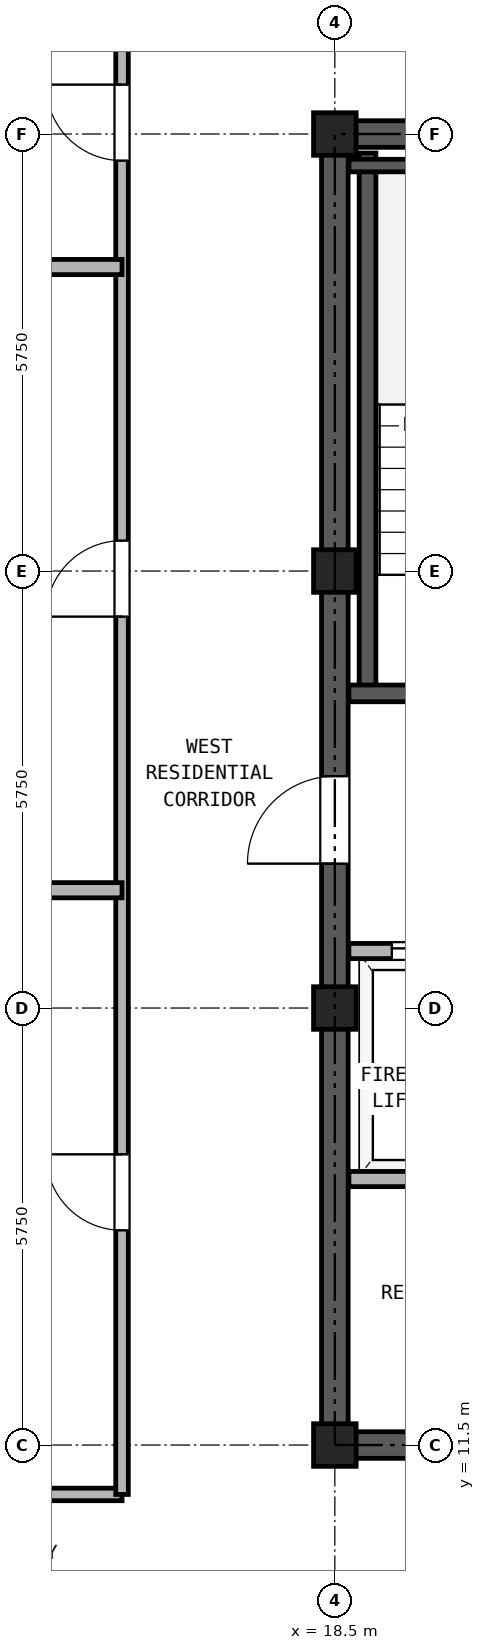
"""IFC4 building model, lengths in metres.
Left out: names, types, materials, properties, quantities, classifications, styles, units other than length and angle.
Written with IfcOpenShell. Run it as: python <this file> out.ifc"""

import sys

from ifc_helpers import new_model, si_unit, direction, frame, frame_2d, origin, origin_2d, place, context, subcontext, project, spatial, rectangle, hollow_rectangle, extrude, source, transform, mapped, element, fill, save


model = new_model("IFC4")
c1 = context("Model", 3, precision=1e-05, world=origin(), true_north=direction((0.0, 1.0)))
c2 = subcontext(c1, "Body", "Model", "MODEL_VIEW")
j1 = project(units=[si_unit("LENGTHUNIT", "METRE"), si_unit("PLANEANGLEUNIT", "RADIAN")], contexts=[c1])
p1 = place(None, origin())
s1 = spatial("IfcSite", under=j1, at=p1, CompositionType="ELEMENT")
p2 = place(p1, origin())
s2 = spatial("IfcBuilding", under=s1, at=p2, CompositionType="ELEMENT")
p3 = place(p2, frame((0.0, 0.0, 261.7)))
s3 = spatial("IfcBuildingStorey", under=s2, at=p3, CompositionType="ELEMENT", Elevation=261.7)
m1 = source(origin(), c2, "Body", "SweptSolid", [
    extrude(hollow_rectangle(XDim=0.56, YDim=0.56, WallThickness=0.03, at=origin_2d()), origin(), (0.0, 0.0, 1.0), 2.98),
])
for number, where, z_axis, x_axis in (
    (1, (18.5, 11.5, 0.0), (0.0, 0.0, 1.0), (1.0, 0.0, 0.0)),
    (2, (18.5, 17.25, 0.0), (0.0, 0.0, 1.0), (1.0, 0.0, 0.0)),
    (3, (18.5, 23.0, 0.0), (0.0, 0.0, 1.0), (1.0, 0.0, 0.0)),
    (4, (18.5, 28.75, 0.0), (0.0, 0.0, 1.0), (1.0, 0.0, 0.0)),
):
    element("IfcColumn", number, at=place(p3, frame(where, z_axis=z_axis, x_axis=x_axis)), inside=s3, PredefinedType="COLUMN", context=c2, shape_type="MappedRepresentation", body=[
        mapped(m1, transform((0.0, 0.0, 0.0), x_axis=(1.0, 0.0, 0.0), y_axis=(0.0, 1.0, 0.0), z_axis=(0.0, 0.0, 1.0), scale=1.0)),
    ])
p4 = place(p3, frame((18.325, 11.5, 0.0), z_axis=(0.0, 0.0, 1.0), x_axis=(1.0, 0.0, 0.0)))
e5 = element("IfcWall", 5, at=p4, inside=s3, PredefinedType="SHEAR", context=c2, shape_type="SweptSolid", body=[
    extrude(rectangle(XDim=10.35, YDim=0.35, at=frame_2d((5.175, 0.0))), origin(), (0.0, 0.0, 1.0), 2.98),
])
p5 = place(p4, frame((1.775, 0.0, 0.0)))
e6 = element("IfcOpeningElement", 6, at=p5, cuts=e5, PredefinedType="OPENING", context=c2, shape_type="SweptSolid", body=[
    extrude(rectangle(XDim=0.95, YDim=2.15, at=frame_2d((0.475, 1.075))), frame((0.0, 0.185, 0.0), z_axis=(0.0, -1.0, 0.0), x_axis=(1.0, 0.0, 0.0)), (0.0, 0.0, 1.0), 0.37),
])
p6 = place(p4, frame((5.275, 0.0, 0.0)))
e7 = element("IfcOpeningElement", 7, at=p6, cuts=e5, PredefinedType="OPENING", context=c2, shape_type="SweptSolid", body=[
    extrude(rectangle(XDim=0.95, YDim=2.15, at=frame_2d((0.475, 1.075))), frame((0.0, 0.185, 0.0), z_axis=(0.0, -1.0, 0.0), x_axis=(1.0, 0.0, 0.0)), (0.0, 0.0, 1.0), 0.37),
])
p7 = place(p4, frame((8.175, 0.0, 0.0)))
e8 = element("IfcOpeningElement", 8, at=p7, cuts=e5, PredefinedType="OPENING", context=c2, shape_type="SweptSolid", body=[
    extrude(rectangle(XDim=1.1, YDim=2.25, at=frame_2d((0.55, 1.125))), frame((0.0, 0.185, 0.0), z_axis=(0.0, -1.0, 0.0), x_axis=(1.0, 0.0, 0.0)), (0.0, 0.0, 1.0), 0.37),
])
p8 = place(p3, frame((18.325, 28.75, 0.0), z_axis=(0.0, 0.0, 1.0), x_axis=(1.0, 0.0, 0.0)))
e9 = element("IfcWall", 9, at=p8, inside=s3, PredefinedType="SHEAR", context=c2, shape_type="SweptSolid", body=[
    extrude(rectangle(XDim=10.35, YDim=0.35, at=frame_2d((5.175, 0.0))), origin(), (0.0, 0.0, 1.0), 2.98),
])
p9 = place(p8, frame((4.055, 0.0, 0.0)))
e10 = element("IfcOpeningElement", 10, at=p9, cuts=e9, PredefinedType="OPENING", context=c2, shape_type="SweptSolid", body=[
    extrude(rectangle(XDim=0.9, YDim=2.05, at=frame_2d((0.45, 1.025))), frame((0.0, 0.185, 0.0), z_axis=(0.0, -1.0, 0.0), x_axis=(1.0, 0.0, 0.0)), (0.0, 0.0, 1.0), 0.37),
])
p10 = place(p8, frame((5.595, 0.0, 0.0)))
e11 = element("IfcOpeningElement", 11, at=p10, cuts=e9, PredefinedType="OPENING", context=c2, shape_type="SweptSolid", body=[
    extrude(rectangle(XDim=0.9, YDim=2.05, at=frame_2d((0.45, 1.025))), frame((0.0, 0.185, 0.0), z_axis=(0.0, -1.0, 0.0), x_axis=(1.0, 0.0, 0.0)), (0.0, 0.0, 1.0), 0.37),
])
p11 = place(p3, frame((18.5, 11.675, 0.0), z_axis=(0.0, 0.0, 1.0), x_axis=(0.0, 1.0, 0.0)))
e12 = element("IfcWall", 12, at=p11, inside=s3, PredefinedType="SHEAR", context=c2, shape_type="SweptSolid", body=[
    extrude(rectangle(XDim=16.9, YDim=0.35, at=frame_2d((8.45, 0.0))), origin(), (0.0, 0.0, 1.0), 2.98),
])
p12 = place(p11, frame((7.475, 0.0, 0.0)))
e13 = element("IfcOpeningElement", 13, at=p12, cuts=e12, PredefinedType="OPENING", context=c2, shape_type="SweptSolid", body=[
    extrude(rectangle(XDim=1.15, YDim=2.2, at=frame_2d((0.575, 1.1))), frame((0.0, 0.185, 0.0), z_axis=(0.0, -1.0, 0.0), x_axis=(1.0, 0.0, 0.0)), (0.0, 0.0, 1.0), 0.37),
])
p13 = place(p3, frame((18.93, 21.39, 0.0), z_axis=(0.0, 0.0, 1.0), x_axis=(0.0, 1.0, 0.0)))
e14 = element("IfcWall", 14, at=p13, inside=s3, PredefinedType="SOLIDWALL", context=c2, shape_type="SweptSolid", body=[
    extrude(rectangle(XDim=7.11, YDim=0.22, at=frame_2d((3.555, 0.0))), origin(), (0.0, 0.0, 1.0), 2.98),
])
p14 = place(p3, frame((18.685, 28.335, 0.0), z_axis=(0.0, 0.0, 1.0), x_axis=(1.0, 0.0, 0.0)))
e15 = element("IfcWall", 15, at=p14, inside=s3, PredefinedType="PARTITIONING", context=c2, shape_type="SweptSolid", body=[
    extrude(rectangle(XDim=3.425, YDim=0.165, at=frame_2d((1.712, 0.0))), origin(), (0.0, 0.0, 1.0), 2.98),
])
p15 = place(p3, frame((18.685, 21.39, 0.0), z_axis=(0.0, 0.0, 1.0), x_axis=(1.0, 0.0, 0.0)))
e16 = element("IfcWall", 16, at=p15, inside=s3, PredefinedType="SOLIDWALL", context=c2, shape_type="SweptSolid", body=[
    extrude(rectangle(XDim=6.445, YDim=0.22, at=frame_2d((3.222, 0.0))), origin(), (0.0, 0.0, 1.0), 2.98),
])
p16 = place(p15, frame((1.165, 0.0, 0.0)))
e17 = element("IfcOpeningElement", 17, at=p16, cuts=e16, PredefinedType="OPENING", context=c2, shape_type="SweptSolid", body=[
    extrude(rectangle(XDim=1.15, YDim=2.2, at=frame_2d((0.575, 1.1))), frame((0.0, 0.12, 0.0), z_axis=(0.0, -1.0, 0.0), x_axis=(1.0, 0.0, 0.0)), (0.0, 0.0, 1.0), 0.24),
])
p17 = place(p15, frame((4.895, 0.0, 0.0)))
e18 = element("IfcOpeningElement", 18, at=p17, cuts=e16, PredefinedType="OPENING", context=c2, shape_type="SweptSolid", body=[
    extrude(rectangle(XDim=1.1, YDim=2.25, at=frame_2d((0.55, 1.125))), frame((0.0, 0.12, 0.0), z_axis=(0.0, -1.0, 0.0), x_axis=(1.0, 0.0, 0.0)), (0.0, 0.0, 1.0), 0.24),
])
p18 = place(p3, frame((18.685, 18.0, 0.0), z_axis=(0.0, 0.0, 1.0), x_axis=(1.0, 0.0, 0.0)))
e19 = element("IfcWall", 19, at=p18, inside=s3, PredefinedType="PARTITIONING", context=c2, shape_type="SweptSolid", body=[
    extrude(rectangle(XDim=9.63, YDim=0.2, at=frame_2d((4.815, 0.0))), origin(), (0.0, 0.0, 1.0), 2.98),
])
p19 = place(p18, frame((0.565, 0.0, 0.0)))
e20 = element("IfcOpeningElement", 20, at=p19, cuts=e19, PredefinedType="OPENING", context=c2, shape_type="SweptSolid", body=[
    extrude(rectangle(XDim=1.3, YDim=2.3, at=frame_2d((0.65, 1.15))), frame((0.0, 0.11, 0.0), z_axis=(0.0, -1.0, 0.0), x_axis=(1.0, 0.0, 0.0)), (0.0, 0.0, 1.0), 0.22),
])
p20 = place(p18, frame((2.665, 0.0, 0.0)))
e21 = element("IfcOpeningElement", 21, at=p20, cuts=e19, PredefinedType="OPENING", context=c2, shape_type="SweptSolid", body=[
    extrude(rectangle(XDim=1.3, YDim=2.3, at=frame_2d((0.65, 1.15))), frame((0.0, 0.11, 0.0), z_axis=(0.0, -1.0, 0.0), x_axis=(1.0, 0.0, 0.0)), (0.0, 0.0, 1.0), 0.22),
])
p21 = place(p18, frame((5.065, 0.0, 0.0)))
e22 = element("IfcOpeningElement", 22, at=p21, cuts=e19, PredefinedType="OPENING", context=c2, shape_type="SweptSolid", body=[
    extrude(rectangle(XDim=0.9, YDim=2.05, at=frame_2d((0.45, 1.025))), frame((0.0, 0.11, 0.0), z_axis=(0.0, -1.0, 0.0), x_axis=(1.0, 0.0, 0.0)), (0.0, 0.0, 1.0), 0.22),
])
p22 = place(p18, frame((7.765, 0.0, 0.0)))
e23 = element("IfcOpeningElement", 23, at=p22, cuts=e19, PredefinedType="OPENING", context=c2, shape_type="SweptSolid", body=[
    extrude(rectangle(XDim=0.9, YDim=2.05, at=frame_2d((0.45, 1.025))), frame((0.0, 0.11, 0.0), z_axis=(0.0, -1.0, 0.0), x_axis=(1.0, 0.0, 0.0)), (0.0, 0.0, 1.0), 0.22),
])
p23 = place(p3, frame((18.685, 15.0, 0.0), z_axis=(0.0, 0.0, 1.0), x_axis=(1.0, 0.0, 0.0)))
e24 = element("IfcWall", 24, at=p23, inside=s3, PredefinedType="PARTITIONING", context=c2, shape_type="SweptSolid", body=[
    extrude(rectangle(XDim=9.63, YDim=0.2, at=frame_2d((4.815, 0.0))), origin(), (0.0, 0.0, 1.0), 2.98),
])
p24 = place(p3, frame((8.56, 10.85, 0.0), z_axis=(0.0, 0.0, 1.0), x_axis=(1.0, 0.0, 0.0)))
e25 = element("IfcWall", 25, at=p24, inside=s3, PredefinedType="PARTITIONING", context=c2, shape_type="SweptSolid", body=[
    extrude(rectangle(XDim=7.14, YDim=0.165, at=frame_2d((3.57, 0.0))), origin(), (0.0, 0.0, 1.0), 2.98),
])
p25 = place(p3, frame((15.7, 10.85, 0.0), z_axis=(0.0, 0.0, 1.0), x_axis=(0.0, 1.0, 0.0)))
e26 = element("IfcWall", 26, at=p25, inside=s3, PredefinedType="PARTITIONING", context=c2, shape_type="SweptSolid", body=[
    extrude(rectangle(XDim=24.29, YDim=0.165, at=frame_2d((12.145, 0.0))), origin(), (0.0, 0.0, 1.0), 2.98),
])
p26 = place(p25, frame((3.475, 0.0, 0.0)))
e27 = element("IfcOpeningElement", 27, at=p26, cuts=e26, PredefinedType="OPENING", context=c2, shape_type="SweptSolid", body=[
    extrude(rectangle(XDim=1.0, YDim=2.15, at=frame_2d((0.5, 1.075))), frame((0.0, 0.093, 0.0), z_axis=(0.0, -1.0, 0.0), x_axis=(1.0, 0.0, 0.0)), (0.0, 0.0, 1.0), 0.185),
])
p27 = place(p25, frame((11.55, 0.0, 0.0)))
e28 = element("IfcOpeningElement", 28, at=p27, cuts=e26, PredefinedType="OPENING", context=c2, shape_type="SweptSolid", body=[
    extrude(rectangle(XDim=1.0, YDim=2.15, at=frame_2d((0.5, 1.075))), frame((0.0, 0.093, 0.0), z_axis=(0.0, -1.0, 0.0), x_axis=(1.0, 0.0, 0.0)), (0.0, 0.0, 1.0), 0.185),
])
p28 = place(p25, frame((17.55, 0.0, 0.0)))
e29 = element("IfcOpeningElement", 29, at=p28, cuts=e26, PredefinedType="OPENING", context=c2, shape_type="SweptSolid", body=[
    extrude(rectangle(XDim=1.0, YDim=2.15, at=frame_2d((0.5, 1.075))), frame((0.0, 0.093, 0.0), z_axis=(0.0, -1.0, 0.0), x_axis=(1.0, 0.0, 0.0)), (0.0, 0.0, 1.0), 0.185),
])
for number, where, z_axis, x_axis in (
    (30, (5.36, 18.8, 0.0), (0.0, 0.0, 1.0), (1.0, 0.0, 0.0)),
    (31, (5.36, 27.0, 0.0), (0.0, 0.0, 1.0), (1.0, 0.0, 0.0)),
):
    element("IfcWall", number, at=place(p3, frame(where, z_axis=z_axis, x_axis=x_axis)), inside=s3, PredefinedType="PARTITIONING", context=c2, shape_type="SweptSolid", body=[
        extrude(rectangle(XDim=10.34, YDim=0.2, at=frame_2d((5.17, 0.0))), origin(), (0.0, 0.0, 1.0), 2.98),
    ])
p29 = place(p19, origin())
e32 = element("IfcDoor", 32, at=p29, inside=s3, OperationType="DOUBLE_DOOR_SLIDING", PredefinedType="DOOR", context=c2, shape_type="SweptSolid", body=[
    extrude(rectangle(XDim=1.3, YDim=2.3, at=frame_2d((0.65, 1.15))), frame((0.0, 0.025, 0.0), z_axis=(0.0, -1.0, 0.0), x_axis=(1.0, 0.0, 0.0)), (0.0, 0.0, 1.0), 0.05),
])
fill(e20, e32)
p30 = place(p12, frame((1.15, 0.0, 0.0), z_axis=(0.0, 0.0, 1.0), x_axis=(-1.0, 0.0, 0.0)))
e33 = element("IfcDoor", 33, at=p30, inside=s3, OperationType="SINGLE_SWING_LEFT", PredefinedType="DOOR", context=c2, shape_type="SweptSolid", body=[
    extrude(rectangle(XDim=1.15, YDim=2.2, at=frame_2d((0.575, 1.1))), frame((0.0, 0.025, 0.0), z_axis=(0.0, -1.0, 0.0), x_axis=(1.0, 0.0, 0.0)), (0.0, 0.0, 1.0), 0.05),
])
fill(e13, e33)
p31 = place(p26, origin())
e34 = element("IfcDoor", 34, at=p31, inside=s3, OperationType="SINGLE_SWING_RIGHT", PredefinedType="DOOR", context=c2, shape_type="SweptSolid", body=[
    extrude(rectangle(XDim=1.0, YDim=2.15, at=frame_2d((0.5, 1.075))), frame((0.0, 0.025, 0.0), z_axis=(0.0, -1.0, 0.0), x_axis=(1.0, 0.0, 0.0)), (0.0, 0.0, 1.0), 0.05),
])
fill(e27, e34)
p32 = place(p27, origin())
e35 = element("IfcDoor", 35, at=p32, inside=s3, OperationType="SINGLE_SWING_LEFT", PredefinedType="DOOR", context=c2, shape_type="SweptSolid", body=[
    extrude(rectangle(XDim=1.0, YDim=2.15, at=frame_2d((0.5, 1.075))), frame((0.0, 0.025, 0.0), z_axis=(0.0, -1.0, 0.0), x_axis=(1.0, 0.0, 0.0)), (0.0, 0.0, 1.0), 0.05),
])
fill(e28, e35)
p33 = place(p28, origin())
e36 = element("IfcDoor", 36, at=p33, inside=s3, OperationType="SINGLE_SWING_RIGHT", PredefinedType="DOOR", context=c2, shape_type="SweptSolid", body=[
    extrude(rectangle(XDim=1.0, YDim=2.15, at=frame_2d((0.5, 1.075))), frame((0.0, 0.025, 0.0), z_axis=(0.0, -1.0, 0.0), x_axis=(1.0, 0.0, 0.0)), (0.0, 0.0, 1.0), 0.05),
])
fill(e29, e36)
save(model, sys.argv[1])
